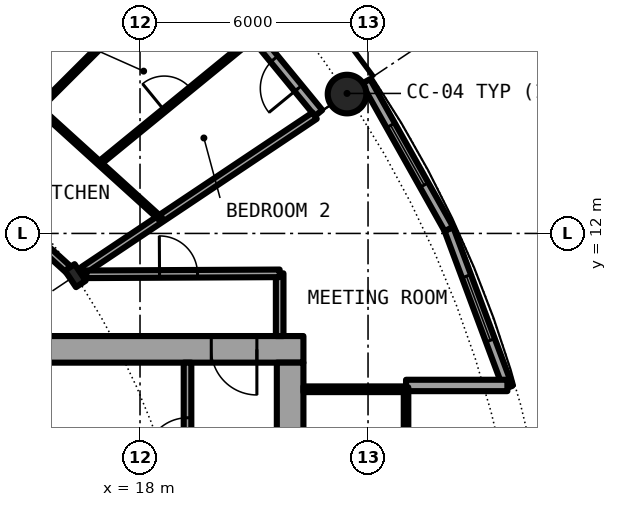
"""IFC4 building model, lengths in metres.
Left out: names, types, materials, properties, quantities, classifications, styles, units other than length and angle.
Written with IfcOpenShell. Run it as: python <this file> out.ifc"""

import sys

from ifc_helpers import new_model, si_unit, direction, frame, frame_2d, origin, origin_2d, place, context, subcontext, project, spatial, rectangle, hollow_circle, i_section, extrude, element, fill, save


model = new_model("IFC4")
c1 = context("Model", 3, precision=1e-05, world=origin(), true_north=direction((0.0, 1.0)))
c2 = subcontext(c1, "Body", "Model", "MODEL_VIEW")
j1 = project(units=[si_unit("LENGTHUNIT", "METRE"), si_unit("PLANEANGLEUNIT", "RADIAN")], contexts=[c1])
p1 = place(None, origin())
s1 = spatial("IfcSite", under=j1, at=p1, CompositionType="ELEMENT")
p2 = place(p1, origin())
s2 = spatial("IfcBuilding", under=s1, at=p2, CompositionType="ELEMENT")
p3 = place(p2, frame((0.0, 0.0, 81.9)))
s3 = spatial("IfcBuildingStorey", under=s2, at=p3, CompositionType="ELEMENT", Elevation=81.9)
p4 = place(p3, frame((23.448, 15.667, 0.0), z_axis=(0.0, 0.0, 1.0), x_axis=(1.0, 0.0, 0.0)))
e1 = element("IfcColumn", 1, at=p4, inside=s3, PredefinedType="COLUMN", context=c2, shape_type="SweptSolid", body=[
    extrude(hollow_circle(Radius=0.508, WallThickness=0.04, at=origin_2d()), origin(), (0.0, 0.0, 1.0), 3.05),
])
p5 = place(p3, frame((16.297, 10.889, 0.0), z_axis=(0.0, 0.0, 1.0), x_axis=(0.831469612303, 0.55557023302, 0.0)))
e2 = element("IfcColumn", 2, at=p5, inside=s3, PredefinedType="COLUMN", context=c2, shape_type="SweptSolid", body=[
    extrude(i_section(OverallWidth=0.306, OverallDepth=0.524, WebThickness=0.021, FlangeThickness=0.04, FilletRadius=0.027, at=origin_2d()), origin(), (0.0, 0.0, 1.0), 3.05),
])
p6 = place(p3, frame((22.699, 15.167, 0.0), z_axis=(0.0, 0.0, 1.0), x_axis=(-0.634382322723, 0.773019449054, 0.0)))
e3 = element("IfcWall", 3, at=p6, inside=s3, PredefinedType="SOLIDWALL", context=c2, shape_type="SweptSolid", body=[
    extrude(rectangle(XDim=5.352, YDim=0.25, at=frame_2d((2.676, 0.0))), origin(), (0.0, 0.0, 1.0), 2.7),
])
p7 = place(p6, frame((0.841, 0.0, 0.0)))
e4 = element("IfcOpeningElement", 4, at=p7, cuts=e3, PredefinedType="OPENING", context=c2, shape_type="SweptSolid", body=[
    extrude(rectangle(XDim=1.0, YDim=2.2, at=frame_2d((0.5, 1.1))), frame((0.0, 0.135, 0.0), z_axis=(0.0, -1.0, 0.0), x_axis=(1.0, 0.0, 0.0)), (0.0, 0.0, 1.0), 0.27),
])
p8 = place(p6, frame((3.111, 0.0, 0.3)))
e5 = element("IfcOpeningElement", 5, at=p8, cuts=e3, PredefinedType="OPENING", context=c2, shape_type="SweptSolid", body=[
    extrude(rectangle(XDim=1.8, YDim=2.1, at=frame_2d((0.9, 1.05))), frame((0.0, 0.135, 0.0), z_axis=(0.0, -1.0, 0.0), x_axis=(1.0, 0.0, 0.0)), (0.0, 0.0, 1.0), 0.27),
])
p9 = place(p3, frame((27.682, 7.945, 0.0), z_axis=(0.0, 0.0, 1.0), x_axis=(-0.349247811493, 0.937030397675, 0.0)))
e6 = element("IfcWall", 6, at=p9, inside=s3, PredefinedType="SOLIDWALL", context=c2, shape_type="SweptSolid", body=[
    extrude(rectangle(XDim=4.452, YDim=0.25, at=frame_2d((2.226, 0.0))), origin(), (0.0, 0.0, 1.0), 2.7),
])
p10 = place(p9, frame((1.327, 0.0, 0.3)))
e7 = element("IfcOpeningElement", 7, at=p10, cuts=e6, PredefinedType="OPENING", context=c2, shape_type="SweptSolid", body=[
    extrude(rectangle(XDim=1.8, YDim=2.1, at=frame_2d((0.9, 1.05))), frame((0.0, 0.135, 0.0), z_axis=(0.0, -1.0, 0.0), x_axis=(1.0, 0.0, 0.0)), (0.0, 0.0, 1.0), 0.27),
])
p11 = place(p3, frame((26.127, 12.117, 0.0), z_axis=(0.0, 0.0, 1.0), x_axis=(-0.489696356642, 0.871893042919, 0.0)))
e8 = element("IfcWall", 8, at=p11, inside=s3, PredefinedType="SOLIDWALL", context=c2, shape_type="SweptSolid", body=[
    extrude(rectangle(XDim=4.454, YDim=0.25, at=frame_2d((2.227, 0.0))), origin(), (0.0, 0.0, 1.0), 2.7),
])
p12 = place(p11, frame((1.327, 0.0, 0.3)))
e9 = element("IfcOpeningElement", 9, at=p12, cuts=e8, PredefinedType="OPENING", context=c2, shape_type="SweptSolid", body=[
    extrude(rectangle(XDim=1.8, YDim=2.1, at=frame_2d((0.9, 1.05))), frame((0.0, 0.135, 0.0), z_axis=(0.0, -1.0, 0.0), x_axis=(1.0, 0.0, 0.0)), (0.0, 0.0, 1.0), 0.27),
])
p13 = place(p3, frame((25.0, 8.0, 0.0), z_axis=(0.0, 0.0, 1.0), x_axis=(1.0, 0.0, 0.0)))
e10 = element("IfcWall", 10, at=p13, inside=s3, PredefinedType="SOLIDWALL", context=c2, shape_type="SweptSolid", body=[
    extrude(rectangle(XDim=2.667, YDim=0.3, at=frame_2d((1.333, 0.0))), origin(), (0.0, 0.0, 1.0), 2.7),
])
p14 = place(p3, frame((22.3, 8.95, 0.0), z_axis=(0.0, 0.0, 1.0), x_axis=(-1.0, 0.0, 0.0)))
e11 = element("IfcWall", 11, at=p14, inside=s3, PredefinedType="SHEAR", context=c2, shape_type="SweptSolid", body=[
    extrude(rectangle(XDim=14.0, YDim=0.7, at=frame_2d((7.0, 0.0))), origin(), (0.0, 0.0, 1.0), 3.05),
])
p15 = place(p14, frame((1.225, 0.0, 0.0)))
e12 = element("IfcOpeningElement", 12, at=p15, cuts=e11, PredefinedType="OPENING", context=c2, shape_type="SweptSolid", body=[
    extrude(rectangle(XDim=1.2, YDim=2.3, at=frame_2d((0.6, 1.15))), frame((0.0, 0.36, 0.0), z_axis=(0.0, -1.0, 0.0), x_axis=(1.0, 0.0, 0.0)), (0.0, 0.0, 1.0), 0.72),
])
p16 = place(p3, frame((21.95, 8.6, 0.0), z_axis=(0.0, 0.0, 1.0), x_axis=(0.0, -1.0, 0.0)))
e13 = element("IfcWall", 13, at=p16, inside=s3, PredefinedType="SHEAR", context=c2, shape_type="SweptSolid", body=[
    extrude(rectangle(XDim=17.2, YDim=0.7, at=frame_2d((8.6, 0.0))), origin(), (0.0, 0.0, 1.0), 3.05),
])
p17 = place(p16, frame((7.7, 0.0, 0.0)))
e14 = element("IfcOpeningElement", 14, at=p17, cuts=e13, PredefinedType="OPENING", context=c2, shape_type="SweptSolid", body=[
    extrude(rectangle(XDim=1.8, YDim=2.3, at=frame_2d((0.9, 1.15))), frame((0.0, 0.36, 0.0), z_axis=(0.0, -1.0, 0.0), x_axis=(1.0, 0.0, 0.0)), (0.0, 0.0, 1.0), 0.72),
])
p18 = place(p3, frame((19.25, 1.575, 0.0), z_axis=(0.0, 0.0, 1.0), x_axis=(0.0, 1.0, 0.0)))
e15 = element("IfcWall", 15, at=p18, inside=s3, PredefinedType="SOLIDWALL", context=c2, shape_type="SweptSolid", body=[
    extrude(rectangle(XDim=7.025, YDim=0.2, at=frame_2d((3.513, 0.0))), origin(), (0.0, 0.0, 1.0), 2.7),
])
p19 = place(p18, frame((4.475, 0.0, 0.0)))
e16 = element("IfcOpeningElement", 16, at=p19, cuts=e15, PredefinedType="OPENING", context=c2, shape_type="SweptSolid", body=[
    extrude(rectangle(XDim=1.1, YDim=2.3, at=frame_2d((0.55, 1.15))), frame((0.0, 0.11, 0.0), z_axis=(0.0, -1.0, 0.0), x_axis=(1.0, 0.0, 0.0)), (0.0, 0.0, 1.0), 0.22),
])
p20 = place(p3, frame((22.3, 7.9, 0.0), z_axis=(0.0, 0.0, 1.0), x_axis=(1.0, 0.0, 0.0)))
e17 = element("IfcWall", 17, at=p20, inside=s3, PredefinedType="PARTITIONING", context=c2, shape_type="SweptSolid", body=[
    extrude(rectangle(XDim=2.64, YDim=0.15, at=frame_2d((1.32, 0.0))), origin(), (0.0, 0.0, 1.0), 2.7),
])
p21 = place(p3, frame((25.0, -7.95, 0.0), z_axis=(0.0, 0.0, 1.0), x_axis=(0.0, 1.0, 0.0)))
e18 = element("IfcWall", 18, at=p21, inside=s3, PredefinedType="PARTITIONING", context=c2, shape_type="SweptSolid", body=[
    extrude(rectangle(XDim=15.9, YDim=0.12, at=frame_2d((7.95, 0.0))), origin(), (0.0, 0.0, 1.0), 2.7),
])
p22 = place(p21, frame((0.95, 0.0, 0.1)))
e19 = element("IfcOpeningElement", 19, at=p22, cuts=e18, PredefinedType="OPENING", context=c2, shape_type="SweptSolid", body=[
    extrude(rectangle(XDim=14.0, YDim=2.35, at=frame_2d((7.0, 1.175))), frame((0.0, 0.07, 0.0), z_axis=(0.0, -1.0, 0.0), x_axis=(1.0, 0.0, 0.0)), (0.0, 0.0, 1.0), 0.14),
])
p23 = place(p3, frame((21.675, 9.3, 0.0), z_axis=(0.0, 0.0, 1.0), x_axis=(0.0, 1.0, 0.0)))
e20 = element("IfcWall", 20, at=p23, inside=s3, PredefinedType="PARTITIONING", context=c2, shape_type="SweptSolid", body=[
    extrude(rectangle(XDim=1.65, YDim=0.2, at=frame_2d((0.825, 0.0))), origin(), (0.0, 0.0, 1.0), 2.7),
])
p24 = place(p3, frame((13.474, 13.448, 0.0), z_axis=(0.0, 0.0, 1.0), x_axis=(0.707766479207, 0.706446467123, 0.0)))
e21 = element("IfcWall", 21, at=p24, inside=s3, PredefinedType="PARTITIONING", context=c2, shape_type="SweptSolid", body=[
    extrude(rectangle(XDim=8.138, YDim=0.1, at=frame_2d((4.069, 0.0))), origin(), (0.0, 0.0, 1.0), 2.7),
])
p25 = place(p24, frame((0.861, 0.0, 0.0)))
e22 = element("IfcOpeningElement", 22, at=p25, cuts=e21, PredefinedType="OPENING", context=c2, shape_type="SweptSolid", body=[
    extrude(rectangle(XDim=0.9, YDim=2.3, at=frame_2d((0.45, 1.15))), frame((0.0, 0.06, 0.0), z_axis=(0.0, -1.0, 0.0), x_axis=(1.0, 0.0, 0.0)), (0.0, 0.0, 1.0), 0.12),
])
p26 = place(p24, frame((4.931, 0.0, 0.0)))
e23 = element("IfcOpeningElement", 23, at=p26, cuts=e21, PredefinedType="OPENING", context=c2, shape_type="SweptSolid", body=[
    extrude(rectangle(XDim=0.9, YDim=2.3, at=frame_2d((0.45, 1.15))), frame((0.0, 0.06, 0.0), z_axis=(0.0, -1.0, 0.0), x_axis=(1.0, 0.0, 0.0)), (0.0, 0.0, 1.0), 0.12),
])
p27 = place(p3, frame((16.515, 11.034, 0.0), z_axis=(0.0, 0.0, 1.0), x_axis=(0.831382022135, 0.555701298605, 0.0)))
e24 = element("IfcWall", 24, at=p27, inside=s3, PredefinedType="PARTITIONING", context=c2, shape_type="SweptSolid", body=[
    extrude(rectangle(XDim=7.313, YDim=0.2, at=frame_2d((3.657, 0.0))), origin(), (0.0, 0.0, 1.0), 2.7),
])
p28 = place(p3, frame((16.933, 13.848, 0.0), z_axis=(0.0, 0.0, 1.0), x_axis=(0.774219894911, 0.632916704097, 0.0)))
e25 = element("IfcWall", 25, at=p28, inside=s3, PredefinedType="PARTITIONING", context=c2, shape_type="SweptSolid", body=[
    extrude(rectangle(XDim=5.301, YDim=0.1, at=frame_2d((2.65, 0.0))), origin(), (0.0, 0.0, 1.0), 2.7),
])
p29 = place(p28, frame((2.201, 0.0, 0.0)))
e26 = element("IfcOpeningElement", 26, at=p29, cuts=e25, PredefinedType="OPENING", context=c2, shape_type="SweptSolid", body=[
    extrude(rectangle(XDim=0.9, YDim=2.3, at=frame_2d((0.45, 1.15))), frame((0.0, 0.06, 0.0), z_axis=(0.0, -1.0, 0.0), x_axis=(1.0, 0.0, 0.0)), (0.0, 0.0, 1.0), 0.12),
])
p30 = place(p3, frame((16.588, 10.925, 0.0), z_axis=(0.0, 0.0, 1.0), x_axis=(0.999988019025, 0.004895079807, 0.0)))
e27 = element("IfcWall", 27, at=p30, inside=s3, PredefinedType="PARTITIONING", context=c2, shape_type="SweptSolid", body=[
    extrude(rectangle(XDim=5.087, YDim=0.2, at=frame_2d((2.543, 0.0))), origin(), (0.0, 0.0, 1.0), 2.7),
])
p31 = place(p30, frame((1.925, 0.0, 0.0)))
e28 = element("IfcOpeningElement", 28, at=p31, cuts=e27, PredefinedType="OPENING", context=c2, shape_type="SweptSolid", body=[
    extrude(rectangle(XDim=1.0, YDim=2.3, at=frame_2d((0.5, 1.15))), frame((0.0, 0.11, 0.0), z_axis=(0.0, -1.0, 0.0), x_axis=(1.0, 0.0, 0.0)), (0.0, 0.0, 1.0), 0.22),
])
p32 = place(p3, frame((9.239, 17.286, 0.0), z_axis=(0.0, 0.0, 1.0), x_axis=(0.740909940942, -0.671604392044, 0.0)))
e29 = element("IfcWall", 29, at=p32, inside=s3, PredefinedType="PARTITIONING", context=c2, shape_type="SweptSolid", body=[
    extrude(rectangle(XDim=9.367, YDim=0.2, at=frame_2d((4.683, 0.0))), origin(), (0.0, 0.0, 1.0), 2.38),
])
p33 = place(p32, frame((3.731, 0.0, 0.0)))
e30 = element("IfcOpeningElement", 30, at=p33, cuts=e29, PredefinedType="OPENING", context=c2, shape_type="SweptSolid", body=[
    extrude(rectangle(XDim=1.0, YDim=2.3, at=frame_2d((0.5, 1.15))), frame((0.0, 0.11, 0.0), z_axis=(0.0, -1.0, 0.0), x_axis=(1.0, 0.0, 0.0)), (0.0, 0.0, 1.0), 0.22),
])
p34 = place(p3, frame((15.332, 15.297, 0.0), z_axis=(0.0, 0.0, 1.0), x_axis=(0.740836325503, -0.671685595212, 0.0)))
e31 = element("IfcWall", 31, at=p34, inside=s3, PredefinedType="PARTITIONING", context=c2, shape_type="SweptSolid", body=[
    extrude(rectangle(XDim=4.335, YDim=0.1, at=frame_2d((2.168, 0.0))), origin(), (0.0, 0.0, 1.0), 2.7),
])
p35 = place(p7, origin())
e32 = element("IfcDoor", 32, at=p35, inside=s3, OperationType="SINGLE_SWING_LEFT", PredefinedType="DOOR", context=c2, shape_type="SweptSolid", body=[
    extrude(rectangle(XDim=1.0, YDim=2.2, at=frame_2d((0.5, 1.1))), frame((0.0, 0.025, 0.0), z_axis=(0.0, -1.0, 0.0), x_axis=(1.0, 0.0, 0.0)), (0.0, 0.0, 1.0), 0.05),
])
fill(e4, e32)
p36 = place(p10, origin())
e33 = element("IfcWindow", 33, at=p36, inside=s3, PartitioningType="SINGLE_PANEL", PredefinedType="WINDOW", context=c2, shape_type="SweptSolid", body=[
    extrude(rectangle(XDim=1.8, YDim=2.1, at=frame_2d((0.9, 1.05))), frame((0.0, 0.03, 0.0), z_axis=(0.0, -1.0, 0.0), x_axis=(1.0, 0.0, 0.0)), (0.0, 0.0, 1.0), 0.06),
])
fill(e7, e33)
p37 = place(p12, origin())
e34 = element("IfcWindow", 34, at=p37, inside=s3, PartitioningType="SINGLE_PANEL", PredefinedType="WINDOW", context=c2, shape_type="SweptSolid", body=[
    extrude(rectangle(XDim=1.8, YDim=2.1, at=frame_2d((0.9, 1.05))), frame((0.0, 0.03, 0.0), z_axis=(0.0, -1.0, 0.0), x_axis=(1.0, 0.0, 0.0)), (0.0, 0.0, 1.0), 0.06),
])
fill(e9, e34)
p38 = place(p19, origin())
e35 = element("IfcDoor", 35, at=p38, inside=s3, OperationType="SINGLE_SWING_LEFT", PredefinedType="DOOR", context=c2, shape_type="SweptSolid", body=[
    extrude(rectangle(XDim=1.1, YDim=2.3, at=frame_2d((0.55, 1.15))), frame((0.0, 0.025, 0.0), z_axis=(0.0, -1.0, 0.0), x_axis=(1.0, 0.0, 0.0)), (0.0, 0.0, 1.0), 0.05),
])
fill(e16, e35)
p39 = place(p15, origin())
e36 = element("IfcDoor", 36, at=p39, inside=s3, OperationType="SINGLE_SWING_RIGHT", PredefinedType="DOOR", context=c2, shape_type="SweptSolid", body=[
    extrude(rectangle(XDim=1.2, YDim=2.3, at=frame_2d((0.6, 1.15))), frame((0.0, 0.025, 0.0), z_axis=(0.0, -1.0, 0.0), x_axis=(1.0, 0.0, 0.0)), (0.0, 0.0, 1.0), 0.05),
])
fill(e12, e36)
p40 = place(p22, origin())
e37 = element("IfcWindow", 37, at=p40, inside=s3, PartitioningType="SINGLE_PANEL", PredefinedType="WINDOW", context=c2, shape_type="SweptSolid", body=[
    extrude(rectangle(XDim=14.0, YDim=2.35, at=frame_2d((7.0, 1.175))), frame((0.0, 0.03, 0.0), z_axis=(0.0, -1.0, 0.0), x_axis=(1.0, 0.0, 0.0)), (0.0, 0.0, 1.0), 0.06),
])
fill(e19, e37)
p41 = place(p29, origin())
e38 = element("IfcDoor", 38, at=p41, inside=s3, OperationType="SINGLE_SWING_RIGHT", PredefinedType="DOOR", context=c2, shape_type="SweptSolid", body=[
    extrude(rectangle(XDim=0.9, YDim=2.3, at=frame_2d((0.45, 1.15))), frame((0.0, 0.025, 0.0), z_axis=(0.0, -1.0, 0.0), x_axis=(1.0, 0.0, 0.0)), (0.0, 0.0, 1.0), 0.05),
])
fill(e26, e38)
p42 = place(p31, origin())
e39 = element("IfcDoor", 39, at=p42, inside=s3, OperationType="SINGLE_SWING_LEFT", PredefinedType="DOOR", context=c2, shape_type="SweptSolid", body=[
    extrude(rectangle(XDim=1.0, YDim=2.3, at=frame_2d((0.5, 1.15))), frame((0.0, 0.025, 0.0), z_axis=(0.0, -1.0, 0.0), x_axis=(1.0, 0.0, 0.0)), (0.0, 0.0, 1.0), 0.05),
])
fill(e28, e39)
save(model, sys.argv[1])
